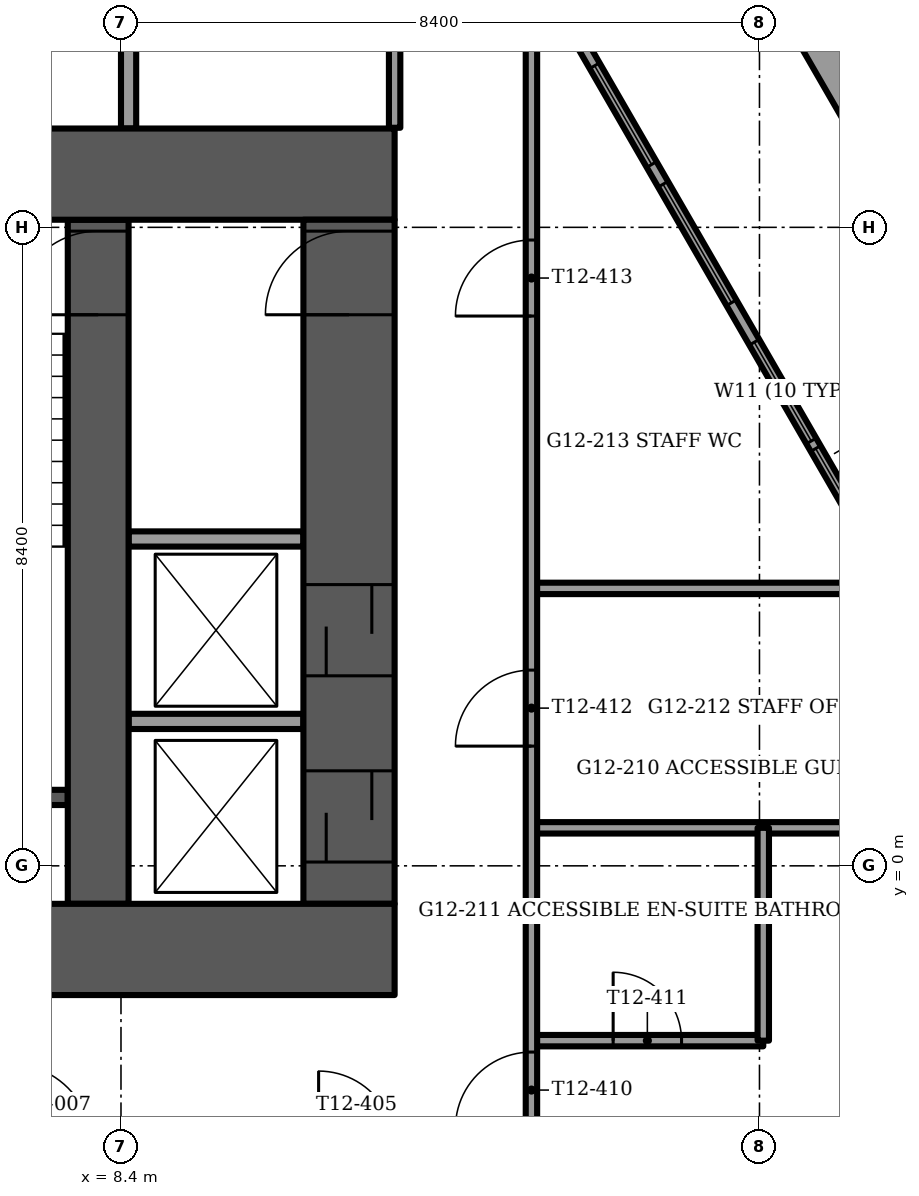
"""IFC4 building model, lengths in metres.
Left out: names, types, materials, properties, quantities, classifications, styles, units other than length and angle.
Written with IfcOpenShell. Run it as: python <this file> out.ifc"""

import sys

from ifc_helpers import new_model, si_unit, direction, frame, frame_2d, origin, place, context, subcontext, project, spatial, rectangle, extrude, element, fill, save


model = new_model("IFC4")
c1 = context("Model", 3, precision=1e-05, world=origin(), true_north=direction((0.0, 1.0)))
c2 = subcontext(c1, "Body", "Model", "MODEL_VIEW")
j1 = project(units=[si_unit("LENGTHUNIT", "METRE"), si_unit("PLANEANGLEUNIT", "RADIAN")], contexts=[c1])
p1 = place(None, origin())
s1 = spatial("IfcSite", under=j1, at=p1, CompositionType="ELEMENT")
p2 = place(p1, origin())
s2 = spatial("IfcBuilding", under=s1, at=p2, CompositionType="ELEMENT")
p3 = place(p2, frame((0.0, 0.0, 50.5)))
s3 = spatial("IfcBuildingStorey", under=s2, at=p3, CompositionType="ELEMENT", Elevation=50.5)
p4 = place(p3, frame((-12.0, -1.1, -0.3), z_axis=(0.0, 0.0, 1.0), x_axis=(1.0, 0.0, 0.0)))
e1 = element("IfcWall", 1, at=p4, inside=s3, PredefinedType="SHEAR", context=c2, shape_type="SweptSolid", body=[
    extrude(rectangle(XDim=24.0, YDim=1.2, at=frame_2d((12.0, 0.0))), origin(), (0.0, 0.0, 1.0), 3.75),
])
p5 = place(p4, frame((11.2, 0.0, 0.0)))
e2 = element("IfcOpeningElement", 2, at=p5, cuts=e1, PredefinedType="OPENING", context=c2, shape_type="SweptSolid", body=[
    extrude(rectangle(XDim=1.6, YDim=2.1, at=frame_2d((0.8, 1.05))), frame((0.0, 0.6, 0.0), z_axis=(0.0, -1.0, 0.0), x_axis=(1.0, 0.0, 0.0)), (0.0, 0.0, 1.0), 1.2),
])
p6 = place(p3, frame((-12.0, 9.1, -0.3), z_axis=(0.0, 0.0, 1.0), x_axis=(1.0, 0.0, 0.0)))
e3 = element("IfcWall", 3, at=p6, inside=s3, PredefinedType="SHEAR", context=c2, shape_type="SweptSolid", body=[
    extrude(rectangle(XDim=24.0, YDim=1.2, at=frame_2d((12.0, 0.0))), origin(), (0.0, 0.0, 1.0), 3.75),
])
p7 = place(p6, frame((11.2, 0.0, 0.0)))
e4 = element("IfcOpeningElement", 4, at=p7, cuts=e3, PredefinedType="OPENING", context=c2, shape_type="SweptSolid", body=[
    extrude(rectangle(XDim=1.6, YDim=2.1, at=frame_2d((0.8, 1.05))), frame((0.0, 0.6, 0.0), z_axis=(0.0, -1.0, 0.0), x_axis=(1.0, 0.0, 0.0)), (0.0, 0.0, 1.0), 1.2),
])
p8 = place(p6, frame((5.25, 0.0, 0.0)))
e5 = element("IfcOpeningElement", 5, at=p8, cuts=e3, PredefinedType="OPENING", context=c2, shape_type="SweptSolid", body=[
    extrude(rectangle(XDim=1.1, YDim=2.1, at=frame_2d((0.55, 1.05))), frame((0.0, 0.6, 0.0), z_axis=(0.0, -1.0, 0.0), x_axis=(1.0, 0.0, 0.0)), (0.0, 0.0, 1.0), 1.2),
])
p9 = place(p6, frame((17.65, 0.0, 0.0)))
e6 = element("IfcOpeningElement", 6, at=p9, cuts=e3, PredefinedType="OPENING", context=c2, shape_type="SweptSolid", body=[
    extrude(rectangle(XDim=1.1, YDim=2.1, at=frame_2d((0.55, 1.05))), frame((0.0, 0.6, 0.0), z_axis=(0.0, -1.0, 0.0), x_axis=(1.0, 0.0, 0.0)), (0.0, 0.0, 1.0), 1.2),
])
p10 = place(p3, frame((8.1, -0.5, -0.3), z_axis=(0.0, 0.0, 1.0), x_axis=(0.0, 1.0, 0.0)))
e7 = element("IfcWall", 7, at=p10, inside=s3, PredefinedType="SHEAR", context=c2, shape_type="SweptSolid", body=[
    extrude(rectangle(XDim=9.0, YDim=0.8, at=frame_2d((4.5, 0.0))), origin(), (0.0, 0.0, 1.0), 3.75),
])
p11 = place(p10, frame((7.75, 0.0, 0.0)))
e8 = element("IfcOpeningElement", 8, at=p11, cuts=e7, PredefinedType="OPENING", context=c2, shape_type="SweptSolid", body=[
    extrude(rectangle(XDim=1.1, YDim=2.1, at=frame_2d((0.55, 1.05))), frame((0.0, 0.4, 0.0), z_axis=(0.0, -1.0, 0.0), x_axis=(1.0, 0.0, 0.0)), (0.0, 0.0, 1.0), 0.8),
])
p12 = place(p3, frame((11.4, -0.5, -0.3), z_axis=(0.0, 0.0, 1.0), x_axis=(0.0, 1.0, 0.0)))
e9 = element("IfcWall", 9, at=p12, inside=s3, PredefinedType="SHEAR", context=c2, shape_type="SweptSolid", body=[
    extrude(rectangle(XDim=9.0, YDim=1.2, at=frame_2d((4.5, 0.0))), origin(), (0.0, 0.0, 1.0), 3.75),
])
p13 = place(p12, frame((7.75, 0.0, 0.0)))
e10 = element("IfcOpeningElement", 10, at=p13, cuts=e9, PredefinedType="OPENING", context=c2, shape_type="SweptSolid", body=[
    extrude(rectangle(XDim=1.1, YDim=2.1, at=frame_2d((0.55, 1.05))), frame((0.0, 0.6, 0.0), z_axis=(0.0, -1.0, 0.0), x_axis=(1.0, 0.0, 0.0)), (0.0, 0.0, 1.0), 1.2),
])
p14 = place(p12, frame((0.55, 0.0, 0.0)))
e11 = element("IfcOpeningElement", 11, at=p14, cuts=e9, PredefinedType="OPENING", context=c2, shape_type="SweptSolid", body=[
    extrude(rectangle(XDim=1.2, YDim=2.1, at=frame_2d((0.6, 1.05))), frame((0.0, 0.6, 0.0), z_axis=(0.0, -1.0, 0.0), x_axis=(1.0, 0.0, 0.0)), (0.0, 0.0, 1.0), 1.2),
])
p15 = place(p12, frame((3.0, 0.0, 0.0)))
e12 = element("IfcOpeningElement", 12, at=p15, cuts=e9, PredefinedType="OPENING", context=c2, shape_type="SweptSolid", body=[
    extrude(rectangle(XDim=1.2, YDim=2.1, at=frame_2d((0.6, 1.05))), frame((0.0, 0.6, 0.0), z_axis=(0.0, -1.0, 0.0), x_axis=(1.0, 0.0, 0.0)), (0.0, 0.0, 1.0), 1.2),
])
p16 = place(p3, frame((19.827, 7.376, 0.0), z_axis=(0.0, 0.0, 1.0), x_axis=(-0.499997206141, 0.866027016814, 0.0)))
e13 = element("IfcWall", 13, at=p16, inside=s3, PredefinedType="PARAPET", context=c2, shape_type="SweptSolid", body=[
    extrude(rectangle(XDim=7.051, YDim=0.9, at=frame_2d((3.525, 0.0))), origin(), (0.0, 0.0, 1.0), 1.1),
])
p17 = place(p3, frame((11.229, -17.402, 0.0), z_axis=(0.0, 0.0, 1.0), x_axis=(0.500004426522, 0.866022848116, 0.0)))
e14 = element("IfcWall", 14, at=p17, inside=s3, PredefinedType="SOLIDWALL", context=c2, shape_type="SweptSolid", body=[
    extrude(rectangle(XDim=18.912, YDim=0.15, at=frame_2d((9.456, 0.0))), origin(), (0.0, 0.0, 1.0), 3.45),
])
p18 = place(p17, frame((1.356, 0.0, 0.15)))
e15 = element("IfcOpeningElement", 15, at=p18, cuts=e14, PredefinedType="OPENING", context=c2, shape_type="SweptSolid", body=[
    extrude(rectangle(XDim=1.8, YDim=2.85, at=frame_2d((0.9, 1.425))), frame((0.0, 0.075, 0.0), z_axis=(0.0, -1.0, 0.0), x_axis=(1.0, 0.0, 0.0)), (0.0, 0.0, 1.0), 0.15),
])
p19 = place(p17, frame((3.456, 0.0, 0.0)))
e16 = element("IfcOpeningElement", 16, at=p19, cuts=e14, PredefinedType="OPENING", context=c2, shape_type="SweptSolid", body=[
    extrude(rectangle(XDim=1.5, YDim=2.4, at=frame_2d((0.75, 1.2))), frame((0.0, 0.075, 0.0), z_axis=(0.0, -1.0, 0.0), x_axis=(1.0, 0.0, 0.0)), (0.0, 0.0, 1.0), 0.15),
])
p20 = place(p17, frame((5.556, 0.0, 0.15)))
e17 = element("IfcOpeningElement", 17, at=p20, cuts=e14, PredefinedType="OPENING", context=c2, shape_type="SweptSolid", body=[
    extrude(rectangle(XDim=1.8, YDim=2.85, at=frame_2d((0.9, 1.425))), frame((0.0, 0.075, 0.0), z_axis=(0.0, -1.0, 0.0), x_axis=(1.0, 0.0, 0.0)), (0.0, 0.0, 1.0), 0.15),
])
p21 = place(p17, frame((7.656, 0.0, 0.0)))
e18 = element("IfcOpeningElement", 18, at=p21, cuts=e14, PredefinedType="OPENING", context=c2, shape_type="SweptSolid", body=[
    extrude(rectangle(XDim=1.5, YDim=2.4, at=frame_2d((0.75, 1.2))), frame((0.0, 0.075, 0.0), z_axis=(0.0, -1.0, 0.0), x_axis=(1.0, 0.0, 0.0)), (0.0, 0.0, 1.0), 0.15),
])
p22 = place(p17, frame((9.756, 0.0, 0.15)))
e19 = element("IfcOpeningElement", 19, at=p22, cuts=e14, PredefinedType="OPENING", context=c2, shape_type="SweptSolid", body=[
    extrude(rectangle(XDim=1.8, YDim=2.85, at=frame_2d((0.9, 1.425))), frame((0.0, 0.075, 0.0), z_axis=(0.0, -1.0, 0.0), x_axis=(1.0, 0.0, 0.0)), (0.0, 0.0, 1.0), 0.15),
])
p23 = place(p17, frame((11.856, 0.0, 0.0)))
e20 = element("IfcOpeningElement", 20, at=p23, cuts=e14, PredefinedType="OPENING", context=c2, shape_type="SweptSolid", body=[
    extrude(rectangle(XDim=1.5, YDim=2.4, at=frame_2d((0.75, 1.2))), frame((0.0, 0.075, 0.0), z_axis=(0.0, -1.0, 0.0), x_axis=(1.0, 0.0, 0.0)), (0.0, 0.0, 1.0), 0.15),
])
p24 = place(p17, frame((13.956, 0.0, 0.15)))
e21 = element("IfcOpeningElement", 21, at=p24, cuts=e14, PredefinedType="OPENING", context=c2, shape_type="SweptSolid", body=[
    extrude(rectangle(XDim=0.9, YDim=2.85, at=frame_2d((0.45, 1.425))), frame((0.0, 0.075, 0.0), z_axis=(0.0, -1.0, 0.0), x_axis=(1.0, 0.0, 0.0)), (0.0, 0.0, 1.0), 0.15),
])
p25 = place(p3, frame((20.685, 0.042, 0.0), z_axis=(0.0, 0.0, 1.0), x_axis=(-0.49999960747, 0.866025630412, 0.0)))
e22 = element("IfcWall", 22, at=p25, inside=s3, PredefinedType="SOLIDWALL", context=c2, shape_type="SweptSolid", body=[
    extrude(rectangle(XDim=23.384, YDim=0.15, at=frame_2d((11.692, 0.0))), origin(), (0.0, 0.0, 1.0), 3.45),
])
p26 = place(p25, frame((4.491, 0.0, 0.15)))
e23 = element("IfcOpeningElement", 23, at=p26, cuts=e22, PredefinedType="OPENING", context=c2, shape_type="SweptSolid", body=[
    extrude(rectangle(XDim=1.8, YDim=2.85, at=frame_2d((0.9, 1.425))), frame((0.0, 0.075, 0.0), z_axis=(0.0, -1.0, 0.0), x_axis=(1.0, 0.0, 0.0)), (0.0, 0.0, 1.0), 0.15),
])
p27 = place(p25, frame((6.406, 0.0, 0.15)))
e24 = element("IfcOpeningElement", 24, at=p27, cuts=e22, PredefinedType="OPENING", context=c2, shape_type="SweptSolid", body=[
    extrude(rectangle(XDim=1.5, YDim=2.85, at=frame_2d((0.75, 1.425))), frame((0.0, 0.075, 0.0), z_axis=(0.0, -1.0, 0.0), x_axis=(1.0, 0.0, 0.0)), (0.0, 0.0, 1.0), 0.15),
])
p28 = place(p25, frame((8.506, 0.0, 0.15)))
e25 = element("IfcOpeningElement", 25, at=p28, cuts=e22, PredefinedType="OPENING", context=c2, shape_type="SweptSolid", body=[
    extrude(rectangle(XDim=1.8, YDim=2.85, at=frame_2d((0.9, 1.425))), frame((0.0, 0.075, 0.0), z_axis=(0.0, -1.0, 0.0), x_axis=(1.0, 0.0, 0.0)), (0.0, 0.0, 1.0), 0.15),
])
p29 = place(p25, frame((10.606, 0.0, 0.15)))
e26 = element("IfcOpeningElement", 26, at=p29, cuts=e22, PredefinedType="OPENING", context=c2, shape_type="SweptSolid", body=[
    extrude(rectangle(XDim=1.5, YDim=2.85, at=frame_2d((0.75, 1.425))), frame((0.0, 0.075, 0.0), z_axis=(0.0, -1.0, 0.0), x_axis=(1.0, 0.0, 0.0)), (0.0, 0.0, 1.0), 0.15),
])
p30 = place(p25, frame((14.806, 0.0, 0.15)))
e27 = element("IfcOpeningElement", 27, at=p30, cuts=e22, PredefinedType="OPENING", context=c2, shape_type="SweptSolid", body=[
    extrude(rectangle(XDim=1.5, YDim=2.85, at=frame_2d((0.75, 1.425))), frame((0.0, 0.075, 0.0), z_axis=(0.0, -1.0, 0.0), x_axis=(1.0, 0.0, 0.0)), (0.0, 0.0, 1.0), 0.15),
])
p31 = place(p25, frame((18.861, 0.0, 0.15)))
e28 = element("IfcOpeningElement", 28, at=p31, cuts=e22, PredefinedType="OPENING", context=c2, shape_type="SweptSolid", body=[
    extrude(rectangle(XDim=1.5, YDim=2.85, at=frame_2d((0.75, 1.425))), frame((0.0, 0.075, 0.0), z_axis=(0.0, -1.0, 0.0), x_axis=(1.0, 0.0, 0.0)), (0.0, 0.0, 1.0), 0.15),
])
p32 = place(p25, frame((1.422, 0.0, 0.15)))
e29 = element("IfcOpeningElement", 29, at=p32, cuts=e22, PredefinedType="OPENING", context=c2, shape_type="SweptSolid", body=[
    extrude(rectangle(XDim=1.8, YDim=2.73, at=frame_2d((0.9, 1.365))), frame((0.0, 0.075, 0.0), z_axis=(0.0, -1.0, 0.0), x_axis=(1.0, 0.0, 0.0)), (0.0, 0.0, 1.0), 0.15),
])
p33 = place(p25, frame((21.247, 0.0, 0.15)))
e30 = element("IfcOpeningElement", 30, at=p33, cuts=e22, PredefinedType="OPENING", context=c2, shape_type="SweptSolid", body=[
    extrude(rectangle(XDim=1.8, YDim=2.73, at=frame_2d((0.9, 1.365))), frame((0.0, 0.075, 0.0), z_axis=(0.0, -1.0, 0.0), x_axis=(1.0, 0.0, 0.0)), (0.0, 0.0, 1.0), 0.15),
])
p34 = place(p3, frame((4.45, 0.9, -0.3), z_axis=(0.0, 0.0, 1.0), x_axis=(1.0, 0.0, 0.0)))
e31 = element("IfcWall", 31, at=p34, inside=s3, PredefinedType="SOLIDWALL", context=c2, shape_type="SweptSolid", body=[
    extrude(rectangle(XDim=3.25, YDim=0.2, at=frame_2d((1.625, 0.0))), origin(), (0.0, 0.0, 1.0), 3.75),
])
p35 = place(p3, frame((8.5, 9.7, 0.0), z_axis=(0.0, 0.0, 1.0), x_axis=(0.0, 1.0, 0.0)))
e32 = element("IfcWall", 32, at=p35, inside=s3, PredefinedType="PARTITIONING", context=c2, shape_type="SweptSolid", body=[
    extrude(rectangle(XDim=3.9, YDim=0.2, at=frame_2d((1.95, 0.0))), origin(), (0.0, 0.0, 1.0), 3.45),
])
p36 = place(p35, frame((1.35, 0.0, 0.0)))
e33 = element("IfcOpeningElement", 33, at=p36, cuts=e32, PredefinedType="OPENING", context=c2, shape_type="SweptSolid", body=[
    extrude(rectangle(XDim=1.2, YDim=2.1, at=frame_2d((0.6, 1.05))), frame((0.0, 0.1, 0.0), z_axis=(0.0, -1.0, 0.0), x_axis=(1.0, 0.0, 0.0)), (0.0, 0.0, 1.0), 0.2),
])
for number, where, z_axis, x_axis in (
    (34, (8.5, 1.9, 0.0), (0.0, 0.0, 1.0), (1.0, 0.0, 0.0)),
    (35, (8.5, 4.3, 0.0), (0.0, 0.0, 1.0), (1.0, 0.0, 0.0)),
):
    element("IfcWall", number, at=place(p3, frame(where, z_axis=z_axis, x_axis=x_axis)), inside=s3, PredefinedType="PARTITIONING", context=c2, shape_type="SweptSolid", body=[
        extrude(rectangle(XDim=2.3, YDim=0.2, at=frame_2d((1.15, 0.0))), origin(), (0.0, 0.0, 1.0), 3.45),
    ])
p37 = place(p3, frame((13.8, -2.3, 0.0), z_axis=(0.0, 0.0, 1.0), x_axis=(1.0, 0.0, 0.0)))
e36 = element("IfcWall", 36, at=p37, inside=s3, PredefinedType="PARTITIONING", context=c2, shape_type="SweptSolid", body=[
    extrude(rectangle(XDim=3.05, YDim=0.15, at=frame_2d((1.525, 0.0))), origin(), (0.0, 0.0, 1.0), 3.45),
])
p38 = place(p37, frame((1.075, 0.0, 0.0)))
e37 = element("IfcOpeningElement", 37, at=p38, cuts=e36, PredefinedType="OPENING", context=c2, shape_type="SweptSolid", body=[
    extrude(rectangle(XDim=0.9, YDim=2.1, at=frame_2d((0.45, 1.05))), frame((0.0, 0.075, 0.0), z_axis=(0.0, -1.0, 0.0), x_axis=(1.0, 0.0, 0.0)), (0.0, 0.0, 1.0), 0.15),
])
p39 = place(p3, frame((13.8, 0.5, 0.0), z_axis=(0.0, 0.0, 1.0), x_axis=(1.0, 0.0, 0.0)))
e38 = element("IfcWall", 38, at=p39, inside=s3, PredefinedType="PARTITIONING", context=c2, shape_type="SweptSolid", body=[
    extrude(rectangle(XDim=6.672, YDim=0.15, at=frame_2d((3.336, 0.0))), origin(), (0.0, 0.0, 1.0), 3.45),
])
p40 = place(p3, frame((13.8, 3.65, 0.0), z_axis=(0.0, 0.0, 1.0), x_axis=(1.0, 0.0, 0.0)))
e39 = element("IfcWall", 39, at=p40, inside=s3, PredefinedType="PARTITIONING", context=c2, shape_type="SweptSolid", body=[
    extrude(rectangle(XDim=4.853, YDim=0.15, at=frame_2d((2.427, 0.0))), origin(), (0.0, 0.0, 1.0), 3.45),
])
p41 = place(p3, frame((16.85, -2.3, 0.0), z_axis=(0.0, 0.0, 1.0), x_axis=(0.0, 1.0, 0.0)))
e40 = element("IfcWall", 40, at=p41, inside=s3, PredefinedType="PARTITIONING", context=c2, shape_type="SweptSolid", body=[
    extrude(rectangle(XDim=2.8, YDim=0.15, at=frame_2d((1.4, 0.0))), origin(), (0.0, 0.0, 1.0), 3.45),
])
p42 = place(p3, frame((13.8, -3.7, 0.0), z_axis=(0.0, 0.0, 1.0), x_axis=(0.0, 1.0, 0.0)))
e41 = element("IfcWall", 41, at=p42, inside=s3, PredefinedType="PARTITIONING", context=c2, shape_type="SweptSolid", body=[
    extrude(rectangle(XDim=15.756, YDim=0.15, at=frame_2d((7.878, 0.0))), origin(), (0.0, 0.0, 1.0), 3.45),
])
p43 = place(p42, frame((0.25, 0.0, 0.0)))
e42 = element("IfcOpeningElement", 42, at=p43, cuts=e41, PredefinedType="OPENING", context=c2, shape_type="SweptSolid", body=[
    extrude(rectangle(XDim=1.0, YDim=2.1, at=frame_2d((0.5, 1.05))), frame((0.0, 0.075, 0.0), z_axis=(0.0, -1.0, 0.0), x_axis=(1.0, 0.0, 0.0)), (0.0, 0.0, 1.0), 0.15),
])
p44 = place(p42, frame((5.275, 0.0, 0.0)))
e43 = element("IfcOpeningElement", 43, at=p44, cuts=e41, PredefinedType="OPENING", context=c2, shape_type="SweptSolid", body=[
    extrude(rectangle(XDim=1.0, YDim=2.1, at=frame_2d((0.5, 1.05))), frame((0.0, 0.075, 0.0), z_axis=(0.0, -1.0, 0.0), x_axis=(1.0, 0.0, 0.0)), (0.0, 0.0, 1.0), 0.15),
])
p45 = place(p42, frame((10.933, 0.0, 0.0)))
e44 = element("IfcOpeningElement", 44, at=p45, cuts=e41, PredefinedType="OPENING", context=c2, shape_type="SweptSolid", body=[
    extrude(rectangle(XDim=1.0, YDim=2.1, at=frame_2d((0.5, 1.05))), frame((0.0, 0.075, 0.0), z_axis=(0.0, -1.0, 0.0), x_axis=(1.0, 0.0, 0.0)), (0.0, 0.0, 1.0), 0.15),
])
p46 = place(p3, frame((12.0, 9.71, 0.0), z_axis=(0.0, 0.0, 1.0), x_axis=(0.0, 1.0, 0.0)))
e45 = element("IfcWall", 45, at=p46, inside=s3, PredefinedType="PARTITIONING", context=c2, shape_type="SweptSolid", body=[
    extrude(rectangle(XDim=3.89, YDim=0.15, at=frame_2d((1.945, 0.0))), origin(), (0.0, 0.0, 1.0), 3.45),
])
p47 = place(p26, origin())
e46 = element("IfcWindow", 46, at=p47, inside=s3, PartitioningType="SINGLE_PANEL", PredefinedType="WINDOW", context=c2, shape_type="SweptSolid", body=[
    extrude(rectangle(XDim=1.8, YDim=2.85, at=frame_2d((0.9, 1.425))), frame((0.0, 0.03, 0.0), z_axis=(0.0, -1.0, 0.0), x_axis=(1.0, 0.0, 0.0)), (0.0, 0.0, 1.0), 0.06),
])
fill(e23, e46)
p48 = place(p27, origin())
e47 = element("IfcWindow", 47, at=p48, inside=s3, PartitioningType="SINGLE_PANEL", PredefinedType="WINDOW", context=c2, shape_type="SweptSolid", body=[
    extrude(rectangle(XDim=1.5, YDim=2.85, at=frame_2d((0.75, 1.425))), frame((0.0, 0.03, 0.0), z_axis=(0.0, -1.0, 0.0), x_axis=(1.0, 0.0, 0.0)), (0.0, 0.0, 1.0), 0.06),
])
fill(e24, e47)
p49 = place(p28, origin())
e48 = element("IfcWindow", 48, at=p49, inside=s3, PartitioningType="SINGLE_PANEL", PredefinedType="WINDOW", context=c2, shape_type="SweptSolid", body=[
    extrude(rectangle(XDim=1.8, YDim=2.85, at=frame_2d((0.9, 1.425))), frame((0.0, 0.03, 0.0), z_axis=(0.0, -1.0, 0.0), x_axis=(1.0, 0.0, 0.0)), (0.0, 0.0, 1.0), 0.06),
])
fill(e25, e48)
p50 = place(p29, origin())
e49 = element("IfcWindow", 49, at=p50, inside=s3, PartitioningType="SINGLE_PANEL", PredefinedType="WINDOW", context=c2, shape_type="SweptSolid", body=[
    extrude(rectangle(XDim=1.5, YDim=2.85, at=frame_2d((0.75, 1.425))), frame((0.0, 0.03, 0.0), z_axis=(0.0, -1.0, 0.0), x_axis=(1.0, 0.0, 0.0)), (0.0, 0.0, 1.0), 0.06),
])
fill(e26, e49)
p51 = place(p11, origin())
e50 = element("IfcDoor", 50, at=p51, inside=s3, OperationType="SINGLE_SWING_LEFT", PredefinedType="DOOR", context=c2, shape_type="SweptSolid", body=[
    extrude(rectangle(XDim=1.1, YDim=2.1, at=frame_2d((0.55, 1.05))), frame((0.0, 0.025, 0.0), z_axis=(0.0, -1.0, 0.0), x_axis=(1.0, 0.0, 0.0)), (0.0, 0.0, 1.0), 0.05),
])
fill(e8, e50)
p52 = place(p13, origin())
e51 = element("IfcDoor", 51, at=p52, inside=s3, OperationType="SINGLE_SWING_RIGHT", PredefinedType="DOOR", context=c2, shape_type="SweptSolid", body=[
    extrude(rectangle(XDim=1.1, YDim=2.1, at=frame_2d((0.55, 1.05))), frame((0.0, 0.025, 0.0), z_axis=(0.0, -1.0, 0.0), x_axis=(1.0, 0.0, 0.0)), (0.0, 0.0, 1.0), 0.05),
])
fill(e10, e51)
p53 = place(p14, origin())
e52 = element("IfcDoor", 52, at=p53, inside=s3, OperationType="SLIDING_TO_LEFT", PredefinedType="DOOR", context=c2, shape_type="SweptSolid", body=[
    extrude(rectangle(XDim=1.2, YDim=2.1, at=frame_2d((0.6, 1.05))), frame((0.0, 0.025, 0.0), z_axis=(0.0, -1.0, 0.0), x_axis=(1.0, 0.0, 0.0)), (0.0, 0.0, 1.0), 0.05),
])
fill(e11, e52)
p54 = place(p15, origin())
e53 = element("IfcDoor", 53, at=p54, inside=s3, OperationType="SLIDING_TO_LEFT", PredefinedType="DOOR", context=c2, shape_type="SweptSolid", body=[
    extrude(rectangle(XDim=1.2, YDim=2.1, at=frame_2d((0.6, 1.05))), frame((0.0, 0.025, 0.0), z_axis=(0.0, -1.0, 0.0), x_axis=(1.0, 0.0, 0.0)), (0.0, 0.0, 1.0), 0.05),
])
fill(e12, e53)
p55 = place(p43, origin())
e54 = element("IfcDoor", 54, at=p55, inside=s3, OperationType="SINGLE_SWING_LEFT", PredefinedType="DOOR", context=c2, shape_type="SweptSolid", body=[
    extrude(rectangle(XDim=1.0, YDim=2.1, at=frame_2d((0.5, 1.05))), frame((0.0, 0.025, 0.0), z_axis=(0.0, -1.0, 0.0), x_axis=(1.0, 0.0, 0.0)), (0.0, 0.0, 1.0), 0.05),
])
fill(e42, e54)
p56 = place(p38, origin())
e55 = element("IfcDoor", 55, at=p56, inside=s3, OperationType="SINGLE_SWING_LEFT", PredefinedType="DOOR", context=c2, shape_type="SweptSolid", body=[
    extrude(rectangle(XDim=0.9, YDim=2.1, at=frame_2d((0.45, 1.05))), frame((0.0, 0.025, 0.0), z_axis=(0.0, -1.0, 0.0), x_axis=(1.0, 0.0, 0.0)), (0.0, 0.0, 1.0), 0.05),
])
fill(e37, e55)
p57 = place(p44, origin())
e56 = element("IfcDoor", 56, at=p57, inside=s3, OperationType="SINGLE_SWING_LEFT", PredefinedType="DOOR", context=c2, shape_type="SweptSolid", body=[
    extrude(rectangle(XDim=1.0, YDim=2.1, at=frame_2d((0.5, 1.05))), frame((0.0, 0.025, 0.0), z_axis=(0.0, -1.0, 0.0), x_axis=(1.0, 0.0, 0.0)), (0.0, 0.0, 1.0), 0.05),
])
fill(e43, e56)
p58 = place(p45, origin())
e57 = element("IfcDoor", 57, at=p58, inside=s3, OperationType="SINGLE_SWING_LEFT", PredefinedType="DOOR", context=c2, shape_type="SweptSolid", body=[
    extrude(rectangle(XDim=1.0, YDim=2.1, at=frame_2d((0.5, 1.05))), frame((0.0, 0.025, 0.0), z_axis=(0.0, -1.0, 0.0), x_axis=(1.0, 0.0, 0.0)), (0.0, 0.0, 1.0), 0.05),
])
fill(e44, e57)
save(model, sys.argv[1])
